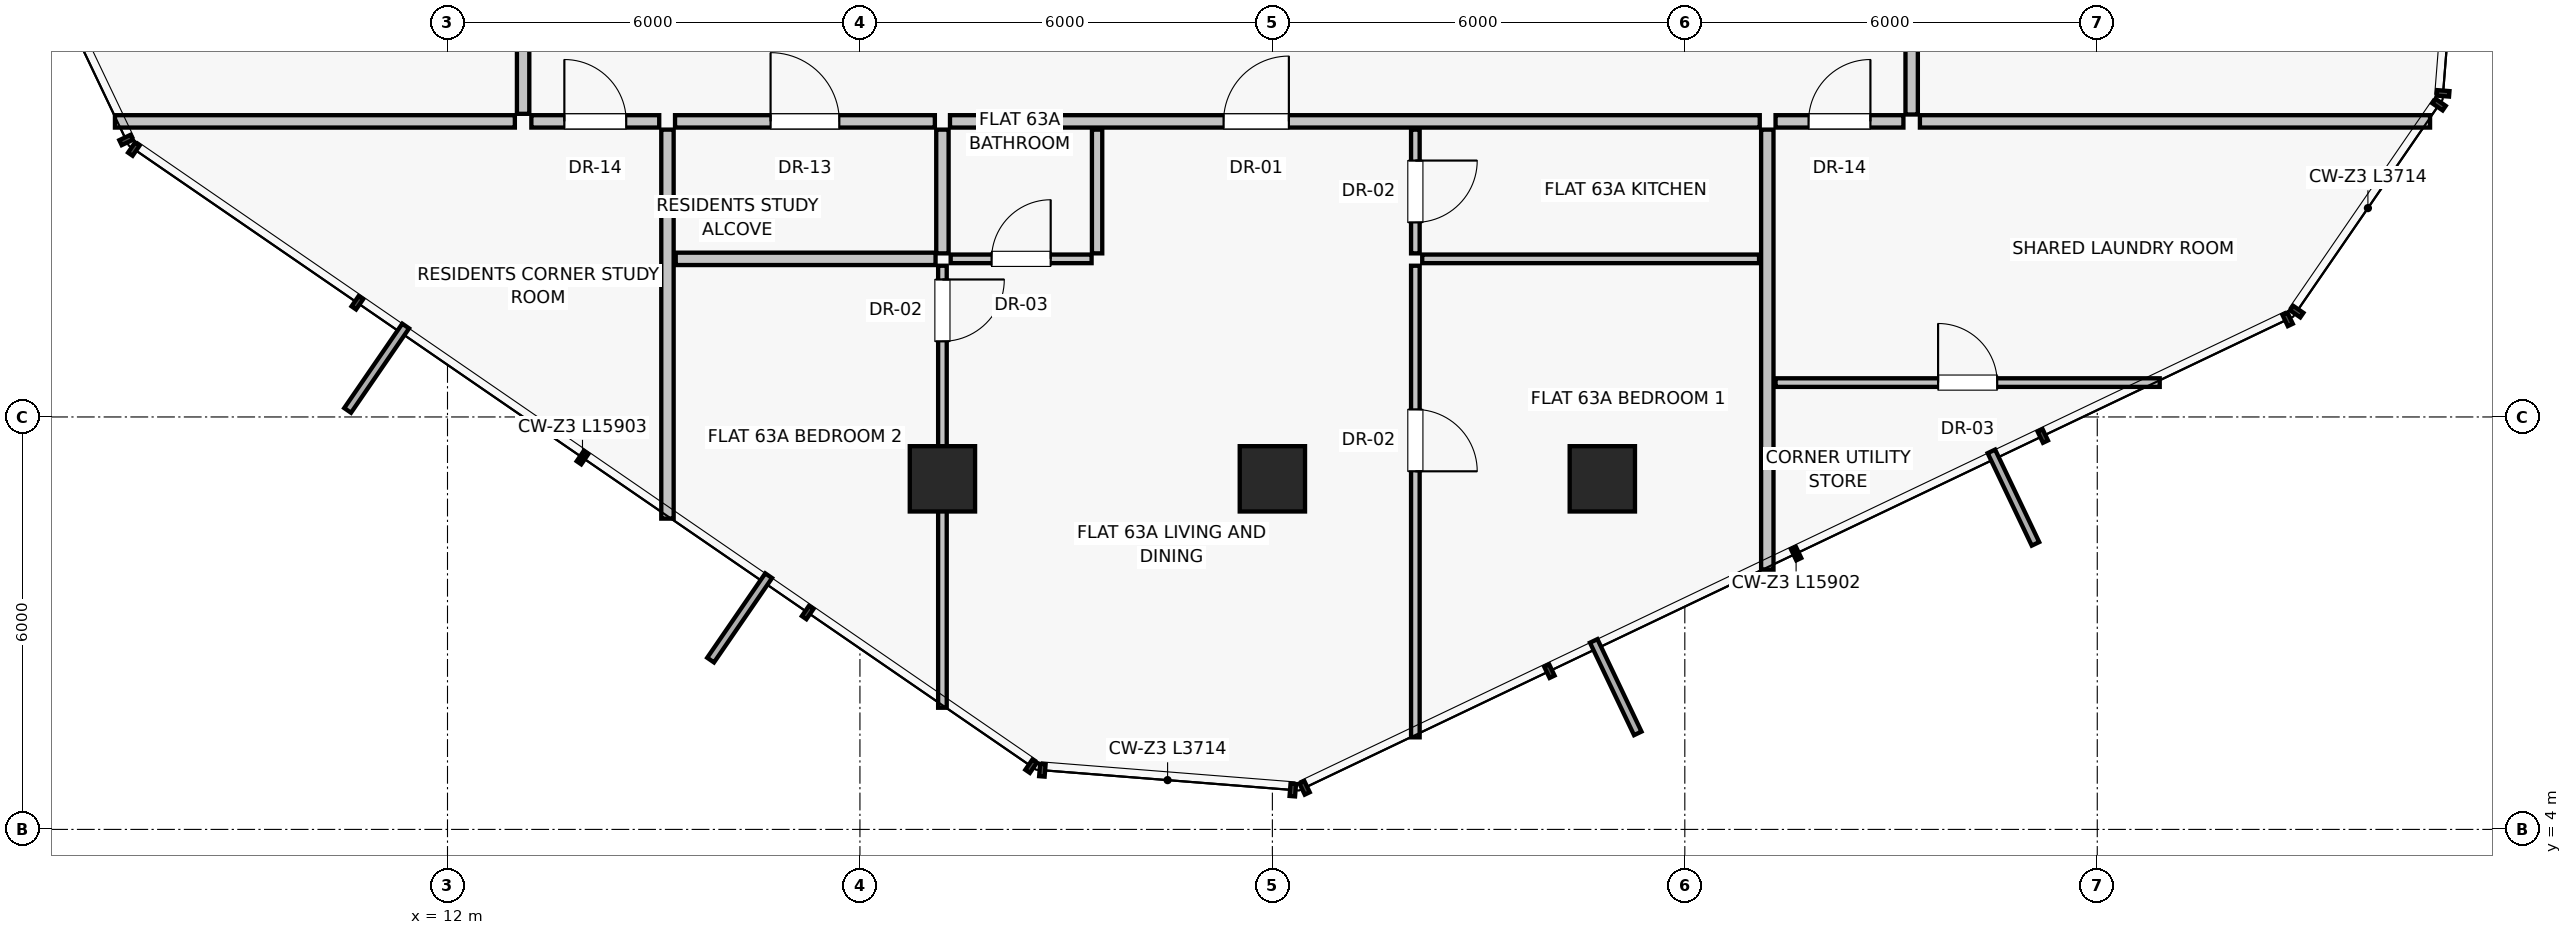
"""IFC4 building model, lengths in metres.
Left out: names, types, materials, properties, quantities, classifications, styles, units other than length and angle.
Written with IfcOpenShell. Run it as: python <this file> out.ifc"""

import sys

from ifc_helpers import new_model, si_unit, direction, frame, frame_2d, origin, origin_2d, place, context, subcontext, project, spatial, rectangle, extrude, source, transform, mapped, element, fill, save


model = new_model("IFC4")
c1 = context("Model", 3, precision=1e-05, world=origin(), true_north=direction((0.0, 1.0)))
c2 = subcontext(c1, "Body", "Model", "MODEL_VIEW")
j1 = project(units=[si_unit("LENGTHUNIT", "METRE"), si_unit("PLANEANGLEUNIT", "RADIAN")], contexts=[c1])
p1 = place(None, origin())
s1 = spatial("IfcSite", under=j1, at=p1, CompositionType="ELEMENT")
p2 = place(p1, origin())
s2 = spatial("IfcBuilding", under=s1, at=p2, CompositionType="ELEMENT")
p3 = place(p2, frame((0.0, 0.0, 222.15)))
s3 = spatial("IfcBuildingStorey", under=s2, at=p3, CompositionType="ELEMENT", Elevation=222.15)
for number, where, z_axis, x_axis in (
    (1, (19.2, 9.1, 0.0), (0.0, 0.0, 1.0), (1.0, 0.0, 0.0)),
    (2, (24.0, 9.1, 0.0), (0.0, 0.0, 1.0), (1.0, 0.0, 0.0)),
    (3, (28.8, 9.1, 0.0), (0.0, 0.0, 1.0), (1.0, 0.0, 0.0)),
):
    element("IfcColumn", number, at=place(p3, frame(where, z_axis=z_axis, x_axis=x_axis)), inside=s3, PredefinedType="COLUMN", context=c2, shape_type="SweptSolid", body=[
        extrude(rectangle(XDim=0.95, YDim=0.95, at=origin_2d()), origin(), (0.0, 0.0, 1.0), 3.25),
    ])
p4 = place(p3, frame((15.2, 14.18, 0.0), z_axis=(0.0, 0.0, 1.0), x_axis=(0.0, -1.0, 0.0)))
e4 = element("IfcWall", 4, at=p4, inside=s3, PredefinedType="PARTITIONING", context=c2, shape_type="SweptSolid", body=[
    extrude(rectangle(XDim=5.659, YDim=0.18, at=frame_2d((2.829, 0.0))), origin(), (0.0, 0.0, 1.0), 2.93),
])
p5 = place(p3, frame((31.2, 14.18, 0.0), z_axis=(0.0, 0.0, 1.0), x_axis=(0.0, -1.0, 0.0)))
e5 = element("IfcWall", 5, at=p5, inside=s3, PredefinedType="PARTITIONING", context=c2, shape_type="SweptSolid", body=[
    extrude(rectangle(XDim=6.4, YDim=0.18, at=frame_2d((3.2, 0.0))), origin(), (0.0, 0.0, 1.0), 2.93),
])
p6 = place(p3, frame((15.31, 14.3, 0.0), z_axis=(0.0, 0.0, 1.0), x_axis=(1.0, 0.0, 0.0)))
e6 = element("IfcWall", 6, at=p6, inside=s3, PredefinedType="PARTITIONING", context=c2, shape_type="SweptSolid", body=[
    extrude(rectangle(XDim=3.78, YDim=0.18, at=frame_2d((1.89, 0.0))), origin(), (0.0, 0.0, 1.0), 2.93),
])
p7 = place(p6, frame((1.39, 0.0, 0.0)))
e7 = element("IfcOpeningElement", 7, at=p7, cuts=e6, PredefinedType="OPENING", context=c2, shape_type="SweptSolid", body=[
    extrude(rectangle(XDim=1.0, YDim=2.01, at=frame_2d((0.5, 1.005))), frame((0.0, 0.1, 0.0), z_axis=(0.0, -1.0, 0.0), x_axis=(1.0, 0.0, 0.0)), (0.0, 0.0, 1.0), 0.2),
])
p8 = place(p3, frame((19.31, 14.3, 0.0), z_axis=(0.0, 0.0, 1.0), x_axis=(1.0, 0.0, 0.0)))
e8 = element("IfcWall", 8, at=p8, inside=s3, PredefinedType="PARTITIONING", context=c2, shape_type="SweptSolid", body=[
    extrude(rectangle(XDim=11.78, YDim=0.18, at=frame_2d((5.89, 0.0))), origin(), (0.0, 0.0, 1.0), 2.93),
])
p9 = place(p8, frame((3.98, 0.0, 0.0)))
e9 = element("IfcOpeningElement", 9, at=p9, cuts=e8, PredefinedType="OPENING", context=c2, shape_type="SweptSolid", body=[
    extrude(rectangle(XDim=0.95, YDim=2.02, at=frame_2d((0.475, 1.01))), frame((0.0, 0.1, 0.0), z_axis=(0.0, -1.0, 0.0), x_axis=(1.0, 0.0, 0.0)), (0.0, 0.0, 1.0), 0.2),
])
p10 = place(p3, frame((15.32, 12.3, 0.0), z_axis=(0.0, 0.0, 1.0), x_axis=(1.0, 0.0, 0.0)))
e10 = element("IfcWall", 10, at=p10, inside=s3, PredefinedType="PARTITIONING", context=c2, shape_type="SweptSolid", body=[
    extrude(rectangle(XDim=3.78, YDim=0.18, at=frame_2d((1.89, 0.0))), origin(), (0.0, 0.0, 1.0), 2.93),
])
p11 = place(p3, frame((19.2, 14.18, 0.0), z_axis=(0.0, 0.0, 1.0), x_axis=(0.0, -1.0, 0.0)))
e11 = element("IfcWall", 11, at=p11, inside=s3, PredefinedType="PARTITIONING", context=c2, shape_type="SweptSolid", body=[
    extrude(rectangle(XDim=1.8, YDim=0.18, at=frame_2d((0.9, 0.0))), origin(), (0.0, 0.0, 1.0), 2.93),
])
p12 = place(p3, frame((19.2, 12.2, 0.0), z_axis=(0.0, 0.0, 1.0), x_axis=(0.0, -1.0, 0.0)))
e12 = element("IfcWall", 12, at=p12, inside=s3, PredefinedType="PARTITIONING", context=c2, shape_type="SweptSolid", body=[
    extrude(rectangle(XDim=6.43, YDim=0.125, at=frame_2d((3.215, 0.0))), origin(), (0.0, 0.0, 1.0), 2.384),
])
p13 = place(p12, frame((0.2, 0.0, 0.0)))
e13 = element("IfcOpeningElement", 13, at=p13, cuts=e12, PredefinedType="OPENING", context=c2, shape_type="SweptSolid", body=[
    extrude(rectangle(XDim=0.9, YDim=2.01, at=frame_2d((0.45, 1.005))), frame((0.0, 0.073, 0.0), z_axis=(0.0, -1.0, 0.0), x_axis=(1.0, 0.0, 0.0)), (0.0, 0.0, 1.0), 0.145),
])
p14 = place(p3, frame((21.45, 14.18, 0.0), z_axis=(0.0, 0.0, 1.0), x_axis=(0.0, -1.0, 0.0)))
e14 = element("IfcWall", 14, at=p14, inside=s3, PredefinedType="PARTITIONING", context=c2, shape_type="SweptSolid", body=[
    extrude(rectangle(XDim=1.8, YDim=0.15, at=frame_2d((0.9, 0.0))), origin(), (0.0, 0.0, 1.0), 2.93),
])
p15 = place(p3, frame((19.32, 12.3, 0.0), z_axis=(0.0, 0.0, 1.0), x_axis=(1.0, 0.0, 0.0)))
e15 = element("IfcWall", 15, at=p15, inside=s3, PredefinedType="PARTITIONING", context=c2, shape_type="SweptSolid", body=[
    extrude(rectangle(XDim=2.05, YDim=0.125, at=frame_2d((1.025, 0.0))), origin(), (0.0, 0.0, 1.0), 2.93),
])
p16 = place(p15, frame((0.595, 0.0, 0.0)))
e16 = element("IfcOpeningElement", 16, at=p16, cuts=e15, PredefinedType="OPENING", context=c2, shape_type="SweptSolid", body=[
    extrude(rectangle(XDim=0.86, YDim=2.01, at=frame_2d((0.43, 1.005))), frame((0.0, 0.073, 0.0), z_axis=(0.0, -1.0, 0.0), x_axis=(1.0, 0.0, 0.0)), (0.0, 0.0, 1.0), 0.145),
])
p17 = place(p3, frame((26.08, 14.18, 0.0), z_axis=(0.0, 0.0, 1.0), x_axis=(0.0, -1.0, 0.0)))
e17 = element("IfcWall", 17, at=p17, inside=s3, PredefinedType="PARTITIONING", context=c2, shape_type="SweptSolid", body=[
    extrude(rectangle(XDim=1.8, YDim=0.125, at=frame_2d((0.9, 0.0))), origin(), (0.0, 0.0, 1.0), 2.93),
])
p18 = place(p17, frame((0.45, 0.0, 0.0)))
e18 = element("IfcOpeningElement", 18, at=p18, cuts=e17, PredefinedType="OPENING", context=c2, shape_type="SweptSolid", body=[
    extrude(rectangle(XDim=0.9, YDim=2.01, at=frame_2d((0.45, 1.005))), frame((0.0, 0.073, 0.0), z_axis=(0.0, -1.0, 0.0), x_axis=(1.0, 0.0, 0.0)), (0.0, 0.0, 1.0), 0.145),
])
p19 = place(p3, frame((26.18, 12.3, 0.0), z_axis=(0.0, 0.0, 1.0), x_axis=(1.0, 0.0, 0.0)))
e19 = element("IfcWall", 19, at=p19, inside=s3, PredefinedType="PARTITIONING", context=c2, shape_type="SweptSolid", body=[
    extrude(rectangle(XDim=4.9, YDim=0.125, at=frame_2d((2.45, 0.0))), origin(), (0.0, 0.0, 1.0), 2.93),
])
p20 = place(p3, frame((26.08, 12.2, 0.0), z_axis=(0.0, 0.0, 1.0), x_axis=(0.0, -1.0, 0.0)))
e20 = element("IfcWall", 20, at=p20, inside=s3, PredefinedType="PARTITIONING", context=c2, shape_type="SweptSolid", body=[
    extrude(rectangle(XDim=6.86, YDim=0.125, at=frame_2d((3.43, 0.0))), origin(), (0.0, 0.0, 1.0), 2.93),
])
p21 = place(p20, frame((2.091, 0.0, 0.0)))
e21 = element("IfcOpeningElement", 21, at=p21, cuts=e20, PredefinedType="OPENING", context=c2, shape_type="SweptSolid", body=[
    extrude(rectangle(XDim=0.9, YDim=2.01, at=frame_2d((0.45, 1.005))), frame((0.0, 0.073, 0.0), z_axis=(0.0, -1.0, 0.0), x_axis=(1.0, 0.0, 0.0)), (0.0, 0.0, 1.0), 0.145),
])
p22 = place(p3, frame((12.98, 14.3, 0.0), z_axis=(0.0, 0.0, 1.0), x_axis=(-1.0, 0.0, 0.0)))
e22 = element("IfcWall", 22, at=p22, inside=s3, PredefinedType="PARTITIONING", context=c2, shape_type="SweptSolid", body=[
    extrude(rectangle(XDim=5.818, YDim=0.18, at=frame_2d((2.909, 0.0))), origin(), (0.0, 0.0, 1.0), 2.93),
])
p23 = place(p3, frame((13.1, 14.41, 0.0), z_axis=(0.0, 0.0, 1.0), x_axis=(0.0, 1.0, 0.0)))
e23 = element("IfcWall", 23, at=p23, inside=s3, PredefinedType="PARTITIONING", context=c2, shape_type="SweptSolid", body=[
    extrude(rectangle(XDim=3.692, YDim=0.18, at=frame_2d((1.846, 0.0))), origin(), (0.0, 0.0, 1.0), 2.577),
])
p24 = place(p23, frame((1.346, 0.0, 0.0)))
e24 = element("IfcOpeningElement", 24, at=p24, cuts=e23, PredefinedType="OPENING", context=c2, shape_type="SweptSolid", body=[
    extrude(rectangle(XDim=1.0, YDim=2.01, at=frame_2d((0.5, 1.005))), frame((0.0, 0.1, 0.0), z_axis=(0.0, -1.0, 0.0), x_axis=(1.0, 0.0, 0.0)), (0.0, 0.0, 1.0), 0.2),
])
p25 = place(p3, frame((33.3, 14.4, 0.0), z_axis=(0.0, 0.0, 1.0), x_axis=(0.0, 1.0, 0.0)))
e25 = element("IfcWall", 25, at=p25, inside=s3, PredefinedType="PARTITIONING", context=c2, shape_type="SweptSolid", body=[
    extrude(rectangle(XDim=1.9, YDim=0.18, at=frame_2d((0.95, 0.0))), origin(), (0.0, 0.0, 1.0), 2.93),
])
p26 = place(p3, frame((13.22, 14.3, 0.0), z_axis=(0.0, 0.0, 1.0), x_axis=(1.0, 0.0, 0.0)))
e26 = element("IfcWall", 26, at=p26, inside=s3, PredefinedType="PARTITIONING", context=c2, shape_type="SweptSolid", body=[
    extrude(rectangle(XDim=1.86, YDim=0.18, at=frame_2d((0.93, 0.0))), origin(), (0.0, 0.0, 1.0), 2.93),
])
p27 = place(p26, frame((0.48, 0.0, 0.0)))
e27 = element("IfcOpeningElement", 27, at=p27, cuts=e26, PredefinedType="OPENING", context=c2, shape_type="SweptSolid", body=[
    extrude(rectangle(XDim=0.9, YDim=2.01, at=frame_2d((0.45, 1.005))), frame((0.0, 0.1, 0.0), z_axis=(0.0, -1.0, 0.0), x_axis=(1.0, 0.0, 0.0)), (0.0, 0.0, 1.0), 0.2),
])
p28 = place(p3, frame((33.42, 14.3, 0.0), z_axis=(0.0, 0.0, 1.0), x_axis=(1.0, 0.0, 0.0)))
e28 = element("IfcWall", 28, at=p28, inside=s3, PredefinedType="PARTITIONING", context=c2, shape_type="SweptSolid", body=[
    extrude(rectangle(XDim=7.422, YDim=0.18, at=frame_2d((3.711, 0.0))), origin(), (0.0, 0.0, 1.0), 2.93),
])
p29 = place(p3, frame((31.32, 14.3, 0.0), z_axis=(0.0, 0.0, 1.0), x_axis=(1.0, 0.0, 0.0)))
e29 = element("IfcWall", 29, at=p29, inside=s3, PredefinedType="PARTITIONING", context=c2, shape_type="SweptSolid", body=[
    extrude(rectangle(XDim=1.86, YDim=0.18, at=frame_2d((0.93, 0.0))), origin(), (0.0, 0.0, 1.0), 2.93),
])
p30 = place(p29, frame((0.48, 0.0, 0.0)))
e30 = element("IfcOpeningElement", 30, at=p30, cuts=e29, PredefinedType="OPENING", context=c2, shape_type="SweptSolid", body=[
    extrude(rectangle(XDim=0.9, YDim=2.01, at=frame_2d((0.45, 1.005))), frame((0.0, 0.1, 0.0), z_axis=(0.0, -1.0, 0.0), x_axis=(1.0, 0.0, 0.0)), (0.0, 0.0, 1.0), 0.2),
])
p31 = place(p3, frame((31.32, 10.5, 0.0), z_axis=(0.0, 0.0, 1.0), x_axis=(1.0, 0.0, 0.0)))
e31 = element("IfcWall", 31, at=p31, inside=s3, PredefinedType="PARTITIONING", context=c2, shape_type="SweptSolid", body=[
    extrude(rectangle(XDim=5.589, YDim=0.125, at=frame_2d((2.794, 0.0))), origin(), (0.0, 0.0, 1.0), 2.93),
])
p32 = place(p31, frame((2.365, 0.0, 0.0)))
e32 = element("IfcOpeningElement", 32, at=p32, cuts=e31, PredefinedType="OPENING", context=c2, shape_type="SweptSolid", body=[
    extrude(rectangle(XDim=0.86, YDim=2.01, at=frame_2d((0.43, 1.005))), frame((0.0, 0.073, 0.0), z_axis=(0.0, -1.0, 0.0), x_axis=(1.0, 0.0, 0.0)), (0.0, 0.0, 1.0), 0.145),
])
m1 = source(origin(), c2, "Body", "SweptSolid", [
    extrude(rectangle(XDim=1.0, YDim=2.01, at=frame_2d((0.5, 1.005))), frame((0.0, 0.025, 0.0), z_axis=(0.0, -1.0, 0.0), x_axis=(1.0, 0.0, 0.0)), (0.0, 0.0, 1.0), 0.05),
])
p33 = place(p7, origin())
e33 = element("IfcDoor", 33, at=p33, inside=s3, OperationType="SINGLE_SWING_LEFT", PredefinedType="DOOR", context=c2, shape_type="MappedRepresentation", body=[
    mapped(m1, transform((0.0, 0.0, 0.0), scale=1.0)),
])
fill(e7, e33)
m2 = source(origin(), c2, "Body", "SweptSolid", [
    extrude(rectangle(XDim=0.95, YDim=2.02, at=frame_2d((0.475, 1.01))), frame((0.0, 0.025, 0.0), z_axis=(0.0, -1.0, 0.0), x_axis=(1.0, 0.0, 0.0)), (0.0, 0.0, 1.0), 0.05),
])
p34 = place(p9, origin())
e34 = element("IfcDoor", 34, at=p34, inside=s3, OperationType="SINGLE_SWING_RIGHT", PredefinedType="DOOR", context=c2, shape_type="MappedRepresentation", body=[
    mapped(m2, transform((0.0, 0.0, 0.0), scale=1.0)),
])
fill(e9, e34)
m3 = source(origin(), c2, "Body", "SweptSolid", [
    extrude(rectangle(XDim=0.9, YDim=2.01, at=frame_2d((0.45, 1.005))), frame((0.0, 0.025, 0.0), z_axis=(0.0, -1.0, 0.0), x_axis=(1.0, 0.0, 0.0)), (0.0, 0.0, 1.0), 0.05),
])
p35 = place(p13, origin())
e35 = element("IfcDoor", 35, at=p35, inside=s3, OperationType="SINGLE_SWING_LEFT", PredefinedType="DOOR", context=c2, shape_type="MappedRepresentation", body=[
    mapped(m3, transform((0.0, 0.0, 0.0), scale=1.0)),
])
fill(e13, e35)
m4 = source(origin(), c2, "Body", "SweptSolid", [
    extrude(rectangle(XDim=0.86, YDim=2.01, at=frame_2d((0.43, 1.005))), frame((0.0, 0.025, 0.0), z_axis=(0.0, -1.0, 0.0), x_axis=(1.0, 0.0, 0.0)), (0.0, 0.0, 1.0), 0.05),
])
p36 = place(p16, origin())
e36 = element("IfcDoor", 36, at=p36, inside=s3, OperationType="SINGLE_SWING_RIGHT", PredefinedType="DOOR", context=c2, shape_type="MappedRepresentation", body=[
    mapped(m4, transform((0.0, 0.0, 0.0), scale=1.0)),
])
fill(e16, e36)
p37 = place(p18, origin())
e37 = element("IfcDoor", 37, at=p37, inside=s3, OperationType="SINGLE_SWING_LEFT", PredefinedType="DOOR", context=c2, shape_type="MappedRepresentation", body=[
    mapped(m3, transform((0.0, 0.0, 0.0), scale=1.0)),
])
fill(e18, e37)
p38 = place(p21, origin())
e38 = element("IfcDoor", 38, at=p38, inside=s3, OperationType="SINGLE_SWING_RIGHT", PredefinedType="DOOR", context=c2, shape_type="MappedRepresentation", body=[
    mapped(m3, transform((0.0, 0.0, 0.0), scale=1.0)),
])
fill(e21, e38)
p39 = place(p27, origin())
e39 = element("IfcDoor", 39, at=p39, inside=s3, OperationType="SINGLE_SWING_LEFT", PredefinedType="DOOR", context=c2, shape_type="MappedRepresentation", body=[
    mapped(m3, transform((0.0, 0.0, 0.0), scale=1.0)),
])
fill(e27, e39)
p40 = place(p30, origin())
e40 = element("IfcDoor", 40, at=p40, inside=s3, OperationType="SINGLE_SWING_RIGHT", PredefinedType="DOOR", context=c2, shape_type="MappedRepresentation", body=[
    mapped(m3, transform((0.0, 0.0, 0.0), scale=1.0)),
])
fill(e30, e40)
p41 = place(p32, origin())
e41 = element("IfcDoor", 41, at=p41, inside=s3, OperationType="SINGLE_SWING_LEFT", PredefinedType="DOOR", context=c2, shape_type="MappedRepresentation", body=[
    mapped(m4, transform((0.0, 0.0, 0.0), scale=1.0)),
])
fill(e32, e41)
save(model, sys.argv[1])
